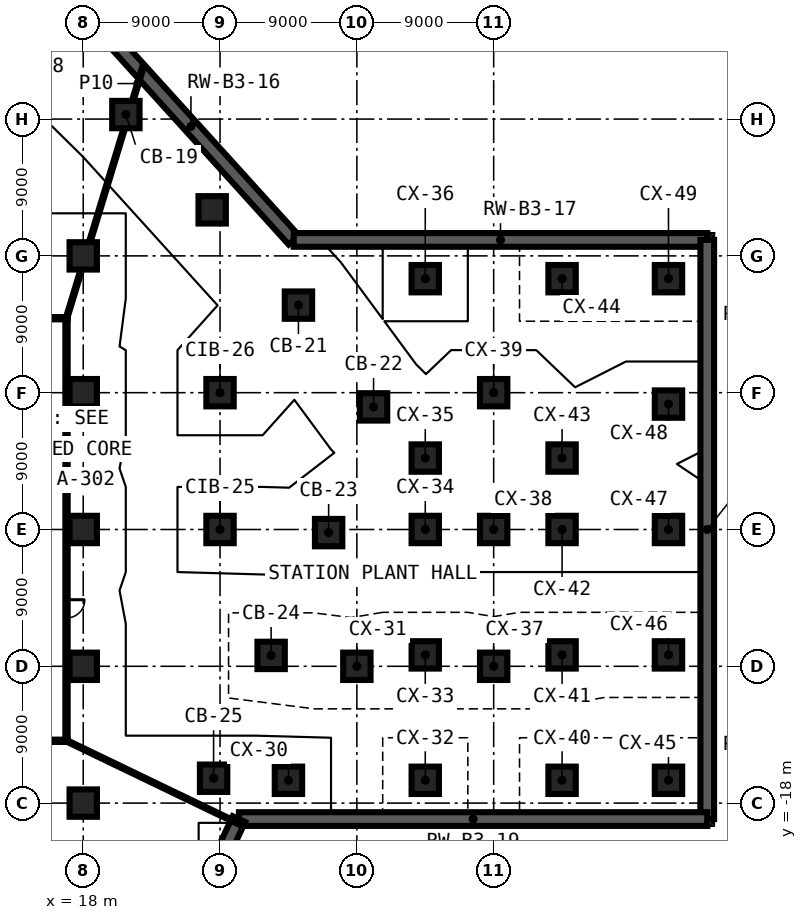
"""IFC4 building model, lengths in metres.
Left out: names, types, materials, properties, quantities, classifications, styles, units other than length and angle.
Written with IfcOpenShell. Run it as: python <this file> out.ifc"""

import sys

from ifc_helpers import new_model, si_unit, direction, frame, frame_2d, origin, origin_2d, place, context, subcontext, project, spatial, rectangle, extrude, element, fill, save


model = new_model("IFC4")
c1 = context("Model", 3, precision=1e-05, world=origin(), true_north=direction((0.0, 1.0)))
c2 = subcontext(c1, "Body", "Model", "MODEL_VIEW")
j1 = project(units=[si_unit("LENGTHUNIT", "METRE"), si_unit("PLANEANGLEUNIT", "RADIAN")], contexts=[c1])
p1 = place(None, origin())
s1 = spatial("IfcSite", under=j1, at=p1, CompositionType="ELEMENT")
p2 = place(p1, origin())
s2 = spatial("IfcBuilding", under=s1, at=p2, CompositionType="ELEMENT")
p3 = place(p2, frame((0.0, 0.0, -17.0)))
s3 = spatial("IfcBuildingStorey", under=s2, at=p3, CompositionType="ELEMENT", Elevation=-17.0)
for number, where, z_axis, x_axis in (
    (1, (20.805, 27.297, 0.0), (0.0, 0.0, 1.0), (1.0, 0.0, 0.0)),
    (2, (26.482, 21.029, 0.0), (0.0, 0.0, 1.0), (1.0, 0.0, 0.0)),
    (3, (32.158, 14.761, 0.0), (0.0, 0.0, 1.0), (1.0, 0.0, 0.0)),
    (4, (37.098, 8.066, 0.0), (0.0, 0.0, 1.0), (1.0, 0.0, 0.0)),
    (5, (34.143, -0.205, 0.0), (0.0, 0.0, 1.0), (1.0, 0.0, 0.0)),
    (6, (30.36, -8.284, 0.0), (0.0, 0.0, 1.0), (1.0, 0.0, 0.0)),
    (7, (26.576, -16.364, 0.0), (0.0, 0.0, 1.0), (1.0, 0.0, 0.0)),
    (8, (18.0, -18.0, 0.0), (0.0, 0.0, 1.0), (1.0, 0.0, 0.0)),
    (9, (18.0, -9.0, 0.0), (0.0, 0.0, 1.0), (1.0, 0.0, 0.0)),
    (10, (18.0, 0.0, 0.0), (0.0, 0.0, 1.0), (1.0, 0.0, 0.0)),
    (11, (18.0, 9.0, 0.0), (0.0, 0.0, 1.0), (1.0, 0.0, 0.0)),
    (12, (18.0, 18.0, 0.0), (0.0, 0.0, 1.0), (1.0, 0.0, 0.0)),
    (13, (27.0, 0.0, 0.0), (0.0, 0.0, 1.0), (1.0, 0.0, 0.0)),
    (14, (27.0, 9.0, 0.0), (0.0, 0.0, 1.0), (1.0, 0.0, 0.0)),
    (15, (31.5, -16.5, 0.0), (0.0, 0.0, 1.0), (1.0, 0.0, 0.0)),
    (16, (36.0, -9.0, 0.0), (0.0, 0.0, 1.0), (1.0, 0.0, 0.0)),
    (17, (40.5, -16.5, 0.0), (0.0, 0.0, 1.0), (1.0, 0.0, 0.0)),
    (18, (40.5, -8.25, 0.0), (0.0, 0.0, 1.0), (1.0, 0.0, 0.0)),
    (19, (40.5, 0.0, 0.0), (0.0, 0.0, 1.0), (1.0, 0.0, 0.0)),
    (20, (40.5, 4.7, 0.0), (0.0, 0.0, 1.0), (1.0, 0.0, 0.0)),
    (21, (40.5, 16.5, 0.0), (0.0, 0.0, 1.0), (1.0, 0.0, 0.0)),
    (22, (45.0, -9.0, 0.0), (0.0, 0.0, 1.0), (1.0, 0.0, 0.0)),
    (23, (45.0, 0.0, 0.0), (0.0, 0.0, 1.0), (1.0, 0.0, 0.0)),
    (24, (45.0, 9.0, 0.0), (0.0, 0.0, 1.0), (1.0, 0.0, 0.0)),
    (25, (49.5, -16.5, 0.0), (0.0, 0.0, 1.0), (1.0, 0.0, 0.0)),
    (26, (49.5, -8.25, 0.0), (0.0, 0.0, 1.0), (1.0, 0.0, 0.0)),
    (27, (49.5, 0.0, 0.0), (0.0, 0.0, 1.0), (1.0, 0.0, 0.0)),
    (28, (49.5, 4.7, 0.0), (0.0, 0.0, 1.0), (1.0, 0.0, 0.0)),
    (29, (49.5, 16.5, 0.0), (0.0, 0.0, 1.0), (1.0, 0.0, 0.0)),
    (30, (56.5, -16.5, 0.0), (0.0, 0.0, 1.0), (1.0, 0.0, 0.0)),
    (31, (56.5, -8.25, 0.0), (0.0, 0.0, 1.0), (1.0, 0.0, 0.0)),
    (32, (56.5, 0.0, 0.0), (0.0, 0.0, 1.0), (1.0, 0.0, 0.0)),
    (33, (56.5, 8.25, 0.0), (0.0, 0.0, 1.0), (1.0, 0.0, 0.0)),
    (34, (56.5, 16.5, 0.0), (0.0, 0.0, 1.0), (1.0, 0.0, 0.0)),
):
    element("IfcColumn", number, at=place(p3, frame(where, z_axis=z_axis, x_axis=x_axis)), inside=s3, PredefinedType="COLUMN", context=c2, shape_type="SweptSolid", body=[
        extrude(rectangle(XDim=1.8, YDim=1.8, at=origin_2d()), origin(), (0.0, 0.0, 1.0), 5.1),
    ])
p4 = place(p3, frame((18.323, 33.986, 0.0), z_axis=(0.0, 0.0, 1.0), x_axis=(0.671255569768, -0.741225984471, 0.0)))
e35 = element("IfcWall", 35, at=p4, inside=s3, PredefinedType="SHEAR", context=c2, shape_type="SweptSolid", body=[
    extrude(rectangle(XDim=20.15, YDim=0.9, at=frame_2d((10.075, 0.0))), origin(), (0.0, 0.0, 1.0), 5.1),
])
p5 = place(p3, frame((31.848, 19.05, 0.0), z_axis=(0.0, 0.0, 1.0), x_axis=(1.0, 0.0, 0.0)))
e36 = element("IfcWall", 36, at=p5, inside=s3, PredefinedType="SHEAR", context=c2, shape_type="SweptSolid", body=[
    extrude(rectangle(XDim=27.202, YDim=0.9, at=frame_2d((13.601, 0.0))), origin(), (0.0, 0.0, 1.0), 5.1),
])
p6 = place(p3, frame((59.05, 19.05, 0.0), z_axis=(0.0, 0.0, 1.0), x_axis=(0.0, -1.0, 0.0)))
e37 = element("IfcWall", 37, at=p6, inside=s3, PredefinedType="SHEAR", context=c2, shape_type="SweptSolid", body=[
    extrude(rectangle(XDim=38.1, YDim=0.9, at=frame_2d((19.05, 0.0))), origin(), (0.0, 0.0, 1.0), 5.1),
])
p7 = place(p3, frame((59.05, -19.05, 0.0), z_axis=(0.0, 0.0, 1.0), x_axis=(-1.0, 0.0, 0.0)))
e38 = element("IfcWall", 38, at=p7, inside=s3, PredefinedType="SHEAR", context=c2, shape_type="SweptSolid", body=[
    extrude(rectangle(XDim=30.806, YDim=0.9, at=frame_2d((15.403, 0.0))), origin(), (0.0, 0.0, 1.0), 5.1),
])
p8 = place(p3, frame((28.244, -19.05, 0.0), z_axis=(0.0, 0.0, 1.0), x_axis=(-0.424123010069, -0.905604589393, 0.0)))
e39 = element("IfcWall", 39, at=p8, inside=s3, PredefinedType="SHEAR", context=c2, shape_type="SweptSolid", body=[
    extrude(rectangle(XDim=13.744, YDim=0.9, at=frame_2d((6.872, 0.0))), origin(), (0.0, 0.0, 1.0), 5.1),
])
p9 = place(p3, frame((16.975, -13.9, 0.0), z_axis=(0.0, 0.0, 1.0), x_axis=(-1.0, 0.0, 0.0)))
e40 = element("IfcWall", 40, at=p9, inside=s3, PredefinedType="PARTITIONING", context=c2, shape_type="SweptSolid", body=[
    extrude(rectangle(XDim=33.95, YDim=0.15, at=frame_2d((16.975, 0.0))), origin(), (0.0, 0.0, 1.0), 5.1),
])
p10 = place(p9, frame((28.375, 0.0, 0.0)))
e41 = element("IfcOpeningElement", 41, at=p10, cuts=e40, PredefinedType="OPENING", context=c2, shape_type="SweptSolid", body=[
    extrude(rectangle(XDim=1.2, YDim=2.1, at=frame_2d((0.6, 1.05))), frame((0.0, 0.085, 0.0), z_axis=(0.0, -1.0, 0.0), x_axis=(1.0, 0.0, 0.0)), (0.0, 0.0, 1.0), 0.17),
])
p11 = place(p9, frame((15.475, 0.0, 0.0)))
e42 = element("IfcOpeningElement", 42, at=p11, cuts=e40, PredefinedType="OPENING", context=c2, shape_type="SweptSolid", body=[
    extrude(rectangle(XDim=1.2, YDim=2.1, at=frame_2d((0.6, 1.05))), frame((0.0, 0.085, 0.0), z_axis=(0.0, -1.0, 0.0), x_axis=(1.0, 0.0, 0.0)), (0.0, 0.0, 1.0), 0.17),
])
p12 = place(p3, frame((-16.975, 13.9, 0.0), z_axis=(0.0, 0.0, 1.0), x_axis=(1.0, 0.0, 0.0)))
e43 = element("IfcWall", 43, at=p12, inside=s3, PredefinedType="PARTITIONING", context=c2, shape_type="SweptSolid", body=[
    extrude(rectangle(XDim=33.95, YDim=0.15, at=frame_2d((16.975, 0.0))), origin(), (0.0, 0.0, 1.0), 5.1),
])
p13 = place(p12, frame((9.887, 0.0, 0.0)))
e44 = element("IfcOpeningElement", 44, at=p13, cuts=e43, PredefinedType="OPENING", context=c2, shape_type="SweptSolid", body=[
    extrude(rectangle(XDim=1.2, YDim=2.1, at=frame_2d((0.6, 1.05))), frame((0.0, 0.085, 0.0), z_axis=(0.0, -1.0, 0.0), x_axis=(1.0, 0.0, 0.0)), (0.0, 0.0, 1.0), 0.17),
])
p14 = place(p3, frame((16.9, 13.9, 0.0), z_axis=(0.0, 0.0, 1.0), x_axis=(0.291202273884, 0.95666150528, 0.0)))
e45 = element("IfcWall", 45, at=p14, inside=s3, PredefinedType="PARTITIONING", context=c2, shape_type="SweptSolid", body=[
    extrude(rectangle(XDim=3.345, YDim=0.1, at=frame_2d((1.673, 0.0))), origin(), (0.0, 0.0, 1.0), 5.1),
])
p15 = place(p3, frame((18.422, 18.9, 0.0), z_axis=(0.0, 0.0, 1.0), x_axis=(0.291192607523, 0.956664447611, 0.0)))
e46 = element("IfcWall", 46, at=p15, inside=s3, PredefinedType="PARTITIONING", context=c2, shape_type="SweptSolid", body=[
    extrude(rectangle(XDim=7.837, YDim=0.1, at=frame_2d((3.918, 0.0))), origin(), (0.0, 0.0, 1.0), 5.1),
])
p16 = place(p3, frame((21.252, 28.197, 0.0), z_axis=(0.0, 0.0, 1.0), x_axis=(0.291210561393, 0.956658982571, 0.0)))
e47 = element("IfcWall", 47, at=p16, inside=s3, PredefinedType="PARTITIONING", context=c2, shape_type="SweptSolid", body=[
    extrude(rectangle(XDim=2.382, YDim=0.1, at=frame_2d((1.191, 0.0))), origin(), (0.0, 0.0, 1.0), 5.1),
])
p17 = place(p3, frame((16.9, 13.825, 0.0), z_axis=(0.0, 0.0, 1.0), x_axis=(0.0, -1.0, 0.0)))
e48 = element("IfcWall", 48, at=p17, inside=s3, PredefinedType="PARTITIONING", context=c2, shape_type="SweptSolid", body=[
    extrude(rectangle(XDim=27.65, YDim=0.15, at=frame_2d((13.825, 0.0))), origin(), (0.0, 0.0, 1.0), 5.1),
])
p18 = place(p17, frame((18.445, 0.0, 0.0)))
e49 = element("IfcOpeningElement", 49, at=p18, cuts=e48, PredefinedType="OPENING", context=c2, shape_type="SweptSolid", body=[
    extrude(rectangle(XDim=1.2, YDim=2.1, at=frame_2d((0.6, 1.05))), frame((0.0, 0.085, 0.0), z_axis=(0.0, -1.0, 0.0), x_axis=(1.0, 0.0, 0.0)), (0.0, 0.0, 1.0), 0.17),
])
p19 = place(p3, frame((16.9, -13.9, 0.0), z_axis=(0.0, 0.0, 1.0), x_axis=(0.901001946138, -0.433815044754, 0.0)))
e50 = element("IfcWall", 50, at=p19, inside=s3, PredefinedType="PARTITIONING", context=c2, shape_type="SweptSolid", body=[
    extrude(rectangle(XDim=12.788, YDim=0.1, at=frame_2d((6.394, 0.0))), origin(), (0.0, 0.0, 1.0), 5.1),
])
p20 = place(p18, origin())
e51 = element("IfcDoor", 51, at=p20, inside=s3, OperationType="SINGLE_SWING_LEFT", PredefinedType="DOOR", context=c2, shape_type="SweptSolid", body=[
    extrude(rectangle(XDim=1.2, YDim=2.1, at=frame_2d((0.6, 1.05))), frame((0.0, 0.025, 0.0), z_axis=(0.0, -1.0, 0.0), x_axis=(1.0, 0.0, 0.0)), (0.0, 0.0, 1.0), 0.05),
])
fill(e49, e51)
save(model, sys.argv[1])
